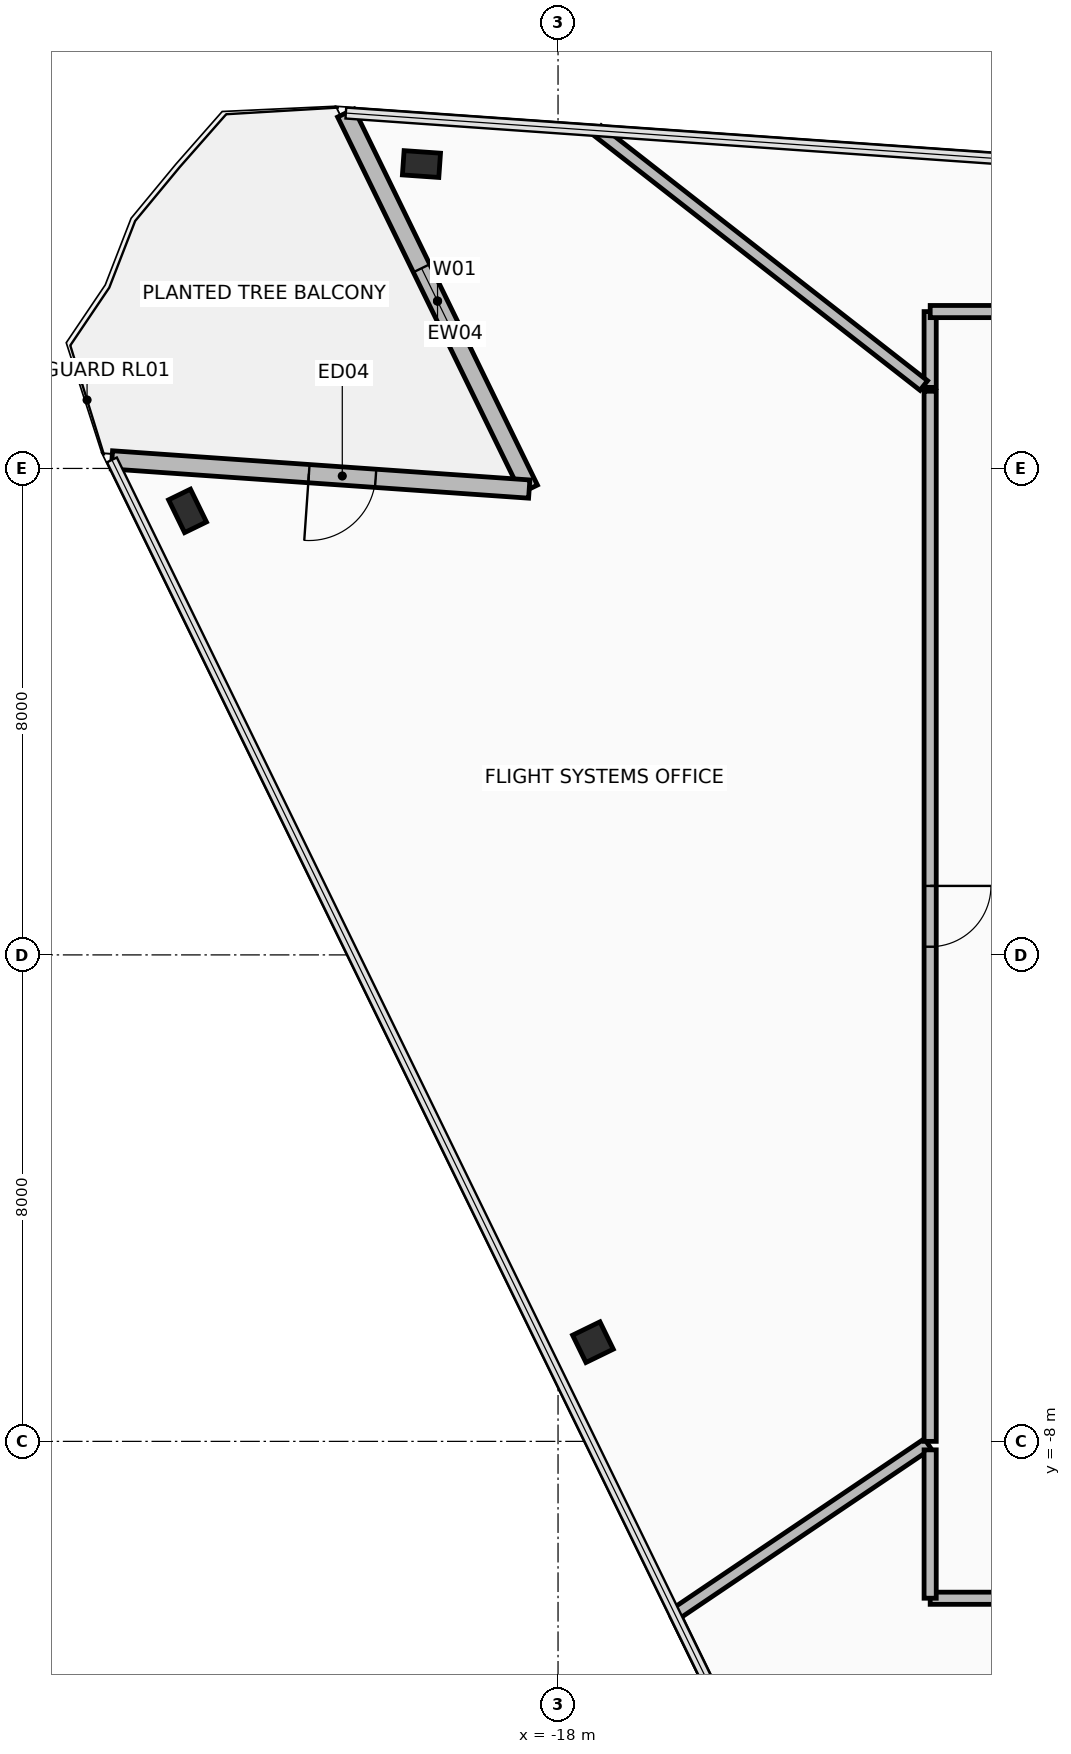
"""IFC4 building model, lengths in metres.
Left out: names, types, materials, properties, quantities, classifications, styles, units other than length and angle.
Written with IfcOpenShell. Run it as: python <this file> out.ifc"""

import sys

from ifc_helpers import new_model, si_unit, direction, frame, frame_2d, origin, origin_2d, place, context, subcontext, project, spatial, rectangle, hollow_rectangle, extrude, element, fill, save


model = new_model("IFC4")
c1 = context("Model", 3, precision=1e-05, world=origin(), true_north=direction((0.0, 1.0)))
c2 = subcontext(c1, "Body", "Model", "MODEL_VIEW")
j1 = project(units=[si_unit("LENGTHUNIT", "METRE"), si_unit("PLANEANGLEUNIT", "RADIAN")], contexts=[c1])
p1 = place(None, origin())
s1 = spatial("IfcSite", under=j1, at=p1, CompositionType="ELEMENT")
p2 = place(p1, origin())
s2 = spatial("IfcBuilding", under=s1, at=p2, CompositionType="ELEMENT")
p3 = place(p2, frame((0.0, 0.0, 230.65)))
s3 = spatial("IfcBuildingStorey", under=s2, at=p3, CompositionType="ELEMENT", Elevation=230.65)
p4 = place(p3, frame((-24.094, 7.302, 0.0), z_axis=(0.0, 0.0, 1.0), x_axis=(-0.438371146789, 0.898794046299, 0.0)))
e1 = element("IfcColumn", 1, at=p4, inside=s3, PredefinedType="COLUMN", context=c2, shape_type="SweptSolid", body=[
    extrude(hollow_rectangle(XDim=0.4, YDim=0.6, WallThickness=0.03, at=origin_2d()), origin(), (0.0, 0.0, 1.0), 3.6),
])
p5 = place(p3, frame((-17.426, -6.369, 0.0), z_axis=(0.0, 0.0, 1.0), x_axis=(-0.438371146789, 0.898794046299, 0.0)))
e2 = element("IfcColumn", 2, at=p5, inside=s3, PredefinedType="COLUMN", context=c2, shape_type="SweptSolid", body=[
    extrude(hollow_rectangle(XDim=0.5, YDim=0.5, WallThickness=0.032, at=origin_2d()), origin(), (0.0, 0.0, 1.0), 3.6),
])
p6 = place(p3, frame((-20.246, 13.006, 0.0), z_axis=(0.0, 0.0, 1.0), x_axis=(-0.99756405026, 0.069756473744, 0.0)))
e3 = element("IfcColumn", 3, at=p6, inside=s3, PredefinedType="COLUMN", context=c2, shape_type="SweptSolid", body=[
    extrude(hollow_rectangle(XDim=0.4, YDim=0.6, WallThickness=0.03, at=origin_2d()), origin(), (0.0, 0.0, 1.0), 3.6),
])
p7 = place(p3, frame((-21.49, 13.844, 0.0), z_axis=(0.0, 0.0, 1.0), x_axis=(0.438391471143, -0.898784133165, 0.0)))
e4 = element("IfcWall", 4, at=p7, inside=s3, PredefinedType="STANDARD", context=c2, shape_type="SweptSolid", body=[
    extrude(rectangle(XDim=6.88, YDim=0.3, at=frame_2d((3.44, 0.0))), origin(), (0.0, 0.0, 1.0), 2.765),
])
p8 = place(p7, frame((2.84, 0.0, 0.485)))
e5 = element("IfcOpeningElement", 5, at=p8, cuts=e4, PredefinedType="OPENING", context=c2, shape_type="SweptSolid", body=[
    extrude(rectangle(XDim=1.2, YDim=2.1, at=frame_2d((0.6, 1.05))), frame((0.0, 0.16, 0.0), z_axis=(0.0, -1.0, 0.0), x_axis=(1.0, 0.0, 0.0)), (0.0, 0.0, 1.0), 0.32),
])
p9 = place(p3, frame((-18.474, 7.661, 0.0), z_axis=(0.0, 0.0, 1.0), x_axis=(-0.997565982203, 0.069728840176, 0.0)))
e6 = element("IfcWall", 6, at=p9, inside=s3, PredefinedType="STANDARD", context=c2, shape_type="SweptSolid", body=[
    extrude(rectangle(XDim=6.88, YDim=0.3, at=frame_2d((3.44, 0.0))), origin(), (0.0, 0.0, 1.0), 2.765),
])
p10 = place(p9, frame((2.532, 0.0, 0.0)))
e7 = element("IfcOpeningElement", 7, at=p10, cuts=e6, PredefinedType="OPENING", context=c2, shape_type="SweptSolid", body=[
    extrude(rectangle(XDim=1.1, YDim=2.2, at=frame_2d((0.55, 1.1))), frame((0.0, 0.16, 0.0), z_axis=(0.0, -1.0, 0.0), x_axis=(1.0, 0.0, 0.0)), (0.0, 0.0, 1.0), 0.32),
])
p11 = place(p3, frame((-11.879, -10.58, 0.0), z_axis=(0.0, 0.0, 1.0), x_axis=(1.0, 0.0, 0.0)))
e8 = element("IfcWall", 8, at=p11, inside=s3, PredefinedType="PARTITIONING", context=c2, shape_type="SweptSolid", body=[
    extrude(rectangle(XDim=14.894, YDim=0.2, at=frame_2d((7.447, 0.0))), origin(), (0.0, 0.0, 1.0), 2.915),
])
p12 = place(p11, frame((7.022, 0.0, 0.0)))
e9 = element("IfcOpeningElement", 9, at=p12, cuts=e8, PredefinedType="OPENING", context=c2, shape_type="SweptSolid", body=[
    extrude(rectangle(XDim=0.85, YDim=2.1, at=frame_2d((0.425, 1.05))), frame((0.0, 0.11, 0.0), z_axis=(0.0, -1.0, 0.0), x_axis=(1.0, 0.0, 0.0)), (0.0, 0.0, 1.0), 0.22),
])
p13 = place(p3, frame((-4.274, -35.046, 0.0), z_axis=(0.0, 0.0, 1.0), x_axis=(-0.438371605443, 0.898793822599, 0.0)))
e10 = element("IfcWall", 10, at=p13, inside=s3, PredefinedType="PARTITIONING", context=c2, shape_type="SweptSolid", body=[
    extrude(rectangle(XDim=26.905, YDim=0.15, at=frame_2d((13.452, 0.0))), origin(), (0.0, 0.0, 1.0), 3.42),
])
p14 = place(p3, frame((-16.06, -10.832, 0.0), z_axis=(0.0, 0.0, 1.0), x_axis=(0.82905262971, 0.559170579673, 0.0)))
e11 = element("IfcWall", 11, at=p14, inside=s3, PredefinedType="PARTITIONING", context=c2, shape_type="SweptSolid", body=[
    extrude(rectangle(XDim=4.994, YDim=0.2, at=frame_2d((2.497, 0.0))), origin(), (0.0, 0.0, 1.0), 2.765),
])
p15 = place(p3, frame((-11.88, -8.14, 0.0), z_axis=(0.0, 0.0, 1.0), x_axis=(0.0, -1.0, 0.0)))
e12 = element("IfcWall", 12, at=p15, inside=s3, PredefinedType="PARTITIONING", context=c2, shape_type="SweptSolid", body=[
    extrude(rectangle(XDim=2.439, YDim=0.2, at=frame_2d((1.22, 0.0))), origin(), (0.0, 0.0, 1.0), 3.115),
])
p16 = place(p3, frame((-11.88, 10.579, 0.0), z_axis=(0.0, 0.0, 1.0), x_axis=(0.0, -1.0, 0.0)))
e13 = element("IfcWall", 13, at=p16, inside=s3, PredefinedType="PARTITIONING", context=c2, shape_type="SweptSolid", body=[
    extrude(rectangle(XDim=1.246, YDim=0.2, at=frame_2d((0.623, 0.0))), origin(), (0.0, 0.0, 1.0), 3.42),
])
p17 = place(p3, frame((-11.985, 9.364, 0.0), z_axis=(0.0, 0.0, 1.0), x_axis=(-0.788014043204, 0.61565726481, 0.0)))
e14 = element("IfcWall", 14, at=p17, inside=s3, PredefinedType="PARTITIONING", context=c2, shape_type="SweptSolid", body=[
    extrude(rectangle(XDim=6.808, YDim=0.2, at=frame_2d((3.404, 0.0))), origin(), (0.0, 0.0, 1.0), 2.765),
])
p18 = place(p3, frame((3.833, 10.58, 0.0), z_axis=(0.0, 0.0, 1.0), x_axis=(-1.0, 0.0, 0.0)))
e15 = element("IfcWall", 15, at=p18, inside=s3, PredefinedType="PARTITIONING", context=c2, shape_type="SweptSolid", body=[
    extrude(rectangle(XDim=15.713, YDim=0.2, at=frame_2d((7.856, 0.0))), origin(), (0.0, 0.0, 1.0), 2.915),
])
p19 = place(p18, frame((6.796, 0.0, 0.0)))
e16 = element("IfcOpeningElement", 16, at=p19, cuts=e15, PredefinedType="OPENING", context=c2, shape_type="SweptSolid", body=[
    extrude(rectangle(XDim=1.0, YDim=2.15, at=frame_2d((0.5, 1.075))), frame((0.0, 0.11, 0.0), z_axis=(0.0, -1.0, 0.0), x_axis=(1.0, 0.0, 0.0)), (0.0, 0.0, 1.0), 0.22),
])
p20 = place(p3, frame((-11.88, 9.27, 0.0), z_axis=(0.0, 0.0, 1.0), x_axis=(0.0, -1.0, 0.0)))
e17 = element("IfcWall", 17, at=p20, inside=s3, PredefinedType="PARTITIONING", context=c2, shape_type="SweptSolid", body=[
    extrude(rectangle(XDim=17.27, YDim=0.2, at=frame_2d((8.635, 0.0))), origin(), (0.0, 0.0, 1.0), 2.765),
])
p21 = place(p20, frame((8.135, 0.0, 0.0)))
e18 = element("IfcOpeningElement", 18, at=p21, cuts=e17, PredefinedType="OPENING", context=c2, shape_type="SweptSolid", body=[
    extrude(rectangle(XDim=1.0, YDim=2.15, at=frame_2d((0.5, 1.075))), frame((0.0, 0.11, 0.0), z_axis=(0.0, -1.0, 0.0), x_axis=(1.0, 0.0, 0.0)), (0.0, 0.0, 1.0), 0.22),
])
p22 = place(p10, frame((1.1, 0.0, 0.0), z_axis=(0.0, 0.0, 1.0), x_axis=(-1.0, 0.0, 0.0)))
e19 = element("IfcDoor", 19, at=p22, inside=s3, OperationType="SINGLE_SWING_LEFT", PredefinedType="DOOR", context=c2, shape_type="SweptSolid", body=[
    extrude(rectangle(XDim=1.1, YDim=2.2, at=frame_2d((0.55, 1.1))), frame((0.0, 0.025, 0.0), z_axis=(0.0, -1.0, 0.0), x_axis=(1.0, 0.0, 0.0)), (0.0, 0.0, 1.0), 0.05),
])
fill(e7, e19)
p23 = place(p8, origin())
e20 = element("IfcWindow", 20, at=p23, inside=s3, PartitioningType="SINGLE_PANEL", PredefinedType="WINDOW", context=c2, shape_type="SweptSolid", body=[
    extrude(rectangle(XDim=1.2, YDim=2.1, at=frame_2d((0.6, 1.05))), frame((0.0, 0.03, 0.0), z_axis=(0.0, -1.0, 0.0), x_axis=(1.0, 0.0, 0.0)), (0.0, 0.0, 1.0), 0.06),
])
fill(e5, e20)
p24 = place(p21, origin())
e21 = element("IfcDoor", 21, at=p24, inside=s3, OperationType="SINGLE_SWING_RIGHT", PredefinedType="DOOR", context=c2, shape_type="SweptSolid", body=[
    extrude(rectangle(XDim=1.0, YDim=2.15, at=frame_2d((0.5, 1.075))), frame((0.0, 0.025, 0.0), z_axis=(0.0, -1.0, 0.0), x_axis=(1.0, 0.0, 0.0)), (0.0, 0.0, 1.0), 0.05),
])
fill(e18, e21)
save(model, sys.argv[1])
